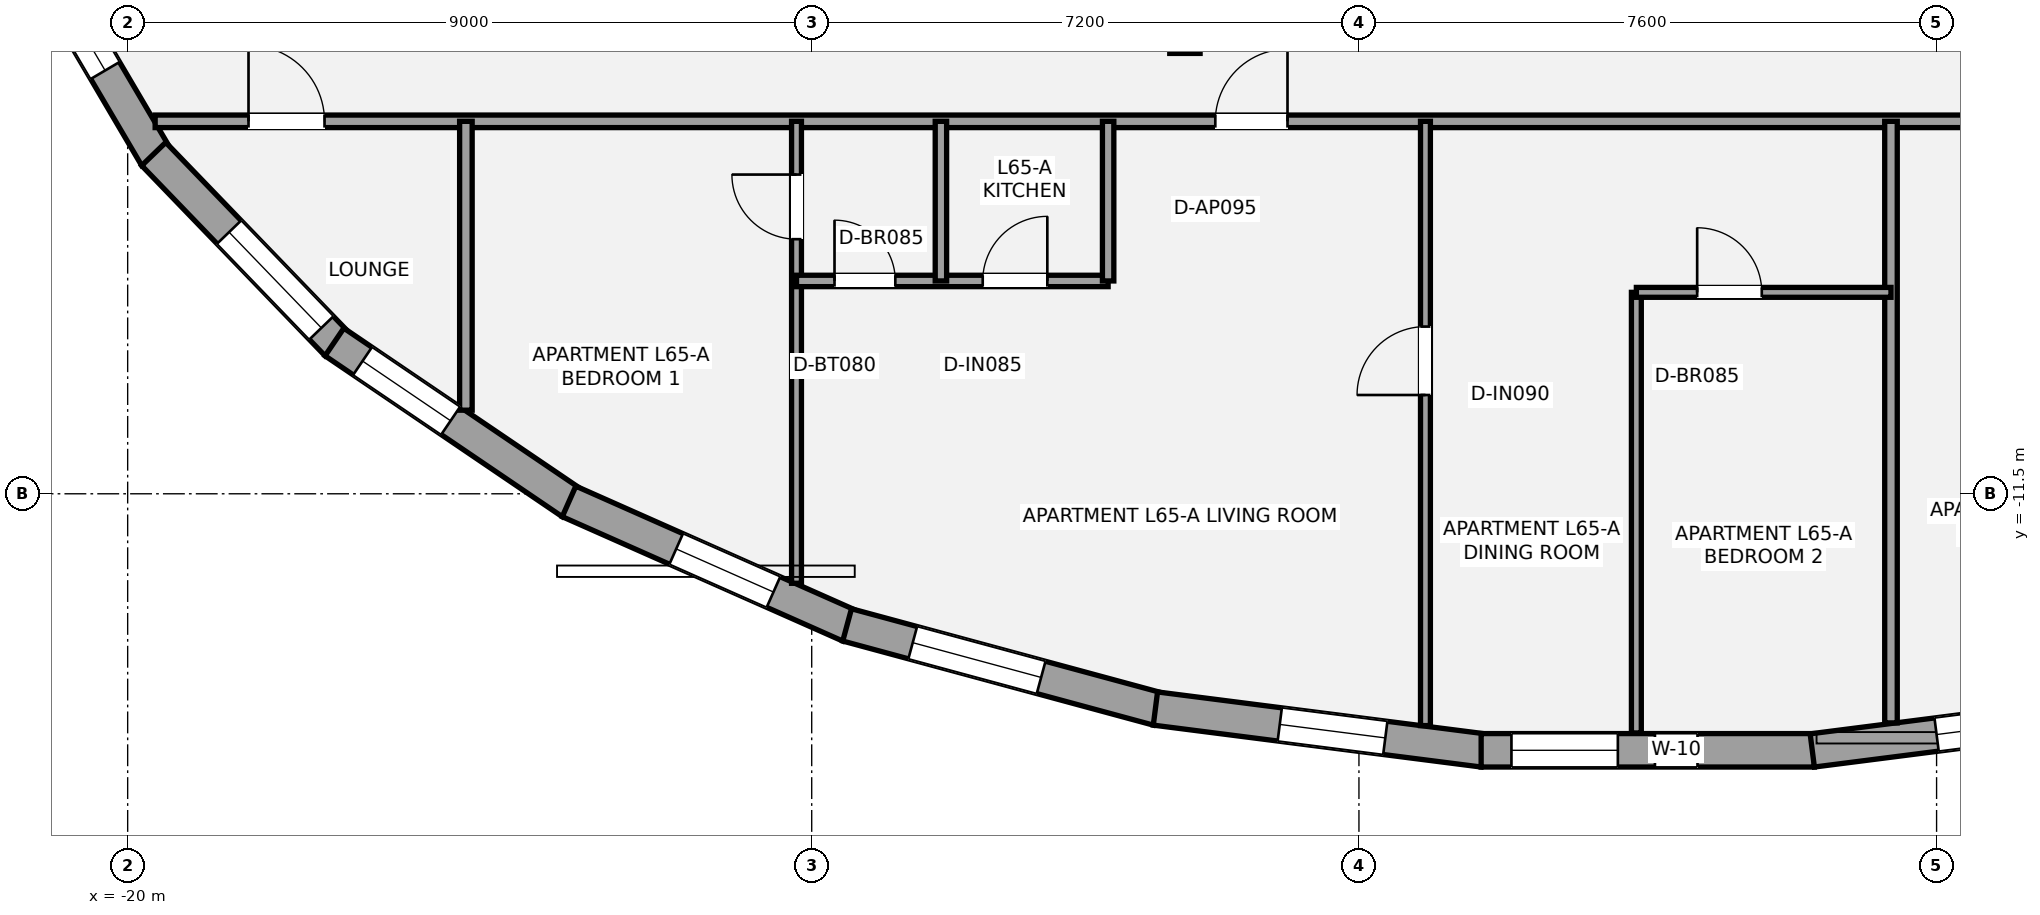
"""IFC4 building model, lengths in metres.
Left out: names, types, materials, properties, quantities, classifications, styles, units other than length and angle.
Written with IfcOpenShell. Run it as: python <this file> out.ifc"""

import sys

from ifc_helpers import new_model, si_unit, direction, frame, frame_2d, origin, origin_2d, place, context, subcontext, project, spatial, rectangle, i_section, extrude, element, fill, save


model = new_model("IFC4")
c1 = context("Model", 3, precision=1e-05, world=origin(), true_north=direction((0.0, 1.0)))
c2 = subcontext(c1, "Body", "Model", "MODEL_VIEW")
j1 = project(units=[si_unit("LENGTHUNIT", "METRE"), si_unit("PLANEANGLEUNIT", "RADIAN")], contexts=[c1])
p1 = place(None, origin())
s1 = spatial("IfcSite", under=j1, at=p1, CompositionType="ELEMENT")
p2 = place(p1, origin())
s2 = spatial("IfcBuilding", under=s1, at=p2, CompositionType="ELEMENT")
p3 = place(p2, frame((0.0, 0.0, 232.05)))
s3 = spatial("IfcBuildingStorey", under=s2, at=p3, CompositionType="ELEMENT", Elevation=232.05)
p4 = place(p3, frame((-6.09, -5.513, 0.0), z_axis=(0.0, 0.0, 1.0), x_axis=(1.0, 0.0, 0.0)))
e1 = element("IfcColumn", 1, at=p4, inside=s3, PredefinedType="COLUMN", context=c2, shape_type="SweptSolid", body=[
    extrude(i_section(OverallWidth=0.399, OverallDepth=0.387, WebThickness=0.021, FlangeThickness=0.033, at=origin_2d()), origin(), (0.0, 0.0, 1.0), 3.15),
])
p5 = place(p3, frame((-19.626, -7.071, 0.0), z_axis=(0.0, 0.0, 1.0), x_axis=(-0.507308799926, 0.861764342218, 0.0)))
e2 = element("IfcWall", 2, at=p5, inside=s3, PredefinedType="STANDARD", context=c2, shape_type="SweptSolid", body=[
    extrude(rectangle(XDim=3.215, YDim=0.44, at=frame_2d((1.607, 0.0))), origin(), (0.0, 0.0, 1.0), 2.336),
])
p6 = place(p5, frame((1.323, 0.0, 0.58)))
e3 = element("IfcOpeningElement", 3, at=p6, cuts=e2, PredefinedType="OPENING", context=c2, shape_type="SweptSolid", body=[
    extrude(rectangle(XDim=1.4, YDim=1.55, at=frame_2d((0.7, 0.775))), frame((0.0, 0.23, 0.0), z_axis=(0.0, -1.0, 0.0), x_axis=(1.0, 0.0, 0.0)), (0.0, 0.0, 1.0), 0.46),
])
p7 = place(p3, frame((-17.244, -9.532, 0.0), z_axis=(0.0, 0.0, 1.0), x_axis=(-0.694030285144, 0.71994580581, 0.0)))
e4 = element("IfcWall", 4, at=p7, inside=s3, PredefinedType="STANDARD", context=c2, shape_type="SweptSolid", body=[
    extrude(rectangle(XDim=3.476, YDim=0.44, at=frame_2d((1.738, 0.0))), origin(), (0.0, 0.0, 1.0), 2.336),
])
p8 = place(p7, frame((0.298, 0.0, 0.55)))
e5 = element("IfcOpeningElement", 5, at=p8, cuts=e4, PredefinedType="OPENING", context=c2, shape_type="SweptSolid", body=[
    extrude(rectangle(XDim=1.75, YDim=1.55, at=frame_2d((0.875, 0.775))), frame((0.0, 0.23, 0.0), z_axis=(0.0, -1.0, 0.0), x_axis=(1.0, 0.0, 0.0)), (0.0, 0.0, 1.0), 0.46),
])
p9 = place(p3, frame((-14.159, -11.619, 0.0), z_axis=(0.0, 0.0, 1.0), x_axis=(-0.827641205742, 0.56125754744, 0.0)))
e6 = element("IfcWall", 6, at=p9, inside=s3, PredefinedType="STANDARD", context=c2, shape_type="SweptSolid", body=[
    extrude(rectangle(XDim=3.771, YDim=0.44, at=frame_2d((1.885, 0.0))), origin(), (0.0, 0.0, 1.0), 2.336),
])
p10 = place(p9, frame((1.924, 0.0, 0.58)))
e7 = element("IfcOpeningElement", 7, at=p10, cuts=e6, PredefinedType="OPENING", context=c2, shape_type="SweptSolid", body=[
    extrude(rectangle(XDim=1.4, YDim=1.55, at=frame_2d((0.7, 0.775))), frame((0.0, 0.23, 0.0), z_axis=(0.0, -1.0, 0.0), x_axis=(1.0, 0.0, 0.0)), (0.0, 0.0, 1.0), 0.46),
])
p11 = place(p3, frame((-10.502, -13.236, 0.0), z_axis=(0.0, 0.0, 1.0), x_axis=(-0.914197700285, 0.405268509501, 0.0)))
e8 = element("IfcWall", 8, at=p11, inside=s3, PredefinedType="STANDARD", context=c2, shape_type="SweptSolid", body=[
    extrude(rectangle(XDim=4.037, YDim=0.44, at=frame_2d((2.019, 0.0))), origin(), (0.0, 0.0, 1.0), 2.336),
])
p12 = place(p11, frame((1.095, 0.0, 0.55)))
e9 = element("IfcOpeningElement", 9, at=p12, cuts=e8, PredefinedType="OPENING", context=c2, shape_type="SweptSolid", body=[
    extrude(rectangle(XDim=1.4, YDim=1.55, at=frame_2d((0.7, 0.775))), frame((0.0, 0.23, 0.0), z_axis=(0.0, -1.0, 0.0), x_axis=(1.0, 0.0, 0.0)), (0.0, 0.0, 1.0), 0.46),
])
p13 = place(p3, frame((-6.448, -14.331, 0.0), z_axis=(0.0, 0.0, 1.0), x_axis=(-0.965250622562, 0.261325918429, 0.0)))
e10 = element("IfcWall", 10, at=p13, inside=s3, PredefinedType="STANDARD", context=c2, shape_type="SweptSolid", body=[
    extrude(rectangle(XDim=4.233, YDim=0.44, at=frame_2d((2.117, 0.0))), origin(), (0.0, 0.0, 1.0), 2.336),
])
p14 = place(p13, frame((1.589, 0.0, 0.55)))
e11 = element("IfcOpeningElement", 11, at=p14, cuts=e10, PredefinedType="OPENING", context=c2, shape_type="SweptSolid", body=[
    extrude(rectangle(XDim=1.75, YDim=1.55, at=frame_2d((0.875, 0.775))), frame((0.0, 0.23, 0.0), z_axis=(0.0, -1.0, 0.0), x_axis=(1.0, 0.0, 0.0)), (0.0, 0.0, 1.0), 0.46),
])
p15 = place(p3, frame((-2.164, -14.877, 0.0), z_axis=(0.0, 0.0, 1.0), x_axis=(-0.991932064275, 0.126770579643, 0.0)))
e12 = element("IfcWall", 12, at=p15, inside=s3, PredefinedType="STANDARD", context=c2, shape_type="SweptSolid", body=[
    extrude(rectangle(XDim=4.349, YDim=0.44, at=frame_2d((2.174, 0.0))), origin(), (0.0, 0.0, 1.0), 2.336),
])
p16 = place(p15, frame((1.299, 0.0, 0.58)))
e13 = element("IfcOpeningElement", 13, at=p16, cuts=e12, PredefinedType="OPENING", context=c2, shape_type="SweptSolid", body=[
    extrude(rectangle(XDim=1.4, YDim=1.55, at=frame_2d((0.7, 0.775))), frame((0.0, 0.23, 0.0), z_axis=(0.0, -1.0, 0.0), x_axis=(1.0, 0.0, 0.0)), (0.0, 0.0, 1.0), 0.46),
])
p17 = place(p3, frame((2.192, -14.875, 0.0), z_axis=(0.0, 0.0, 1.0), x_axis=(-1.0, 0.0, 0.0)))
e14 = element("IfcWall", 14, at=p17, inside=s3, PredefinedType="STANDARD", context=c2, shape_type="SweptSolid", body=[
    extrude(rectangle(XDim=4.385, YDim=0.44, at=frame_2d((2.192, 0.0))), origin(), (0.0, 0.0, 1.0), 2.336),
])
p18 = place(p17, frame((2.586, 0.0, 0.58)))
e15 = element("IfcOpeningElement", 15, at=p18, cuts=e14, PredefinedType="OPENING", context=c2, shape_type="SweptSolid", body=[
    extrude(rectangle(XDim=1.4, YDim=1.55, at=frame_2d((0.7, 0.775))), frame((0.0, 0.23, 0.0), z_axis=(0.0, -1.0, 0.0), x_axis=(1.0, 0.0, 0.0)), (0.0, 0.0, 1.0), 0.46),
])
p19 = place(p17, frame((1.538, 0.0, 0.88)))
e16 = element("IfcOpeningElement", 16, at=p19, cuts=e14, PredefinedType="OPENING", context=c2, shape_type="SweptSolid", body=[
    extrude(rectangle(XDim=0.56, YDim=1.15, at=frame_2d((0.28, 0.575))), frame((0.0, 0.23, 0.0), z_axis=(0.0, -1.0, 0.0), x_axis=(1.0, 0.0, 0.0)), (0.0, 0.0, 1.0), 0.46),
])
p20 = place(p3, frame((6.478, -14.325, 0.0), z_axis=(0.0, 0.0, 1.0), x_axis=(-0.991932064275, -0.126770579643, 0.0)))
e17 = element("IfcWall", 17, at=p20, inside=s3, PredefinedType="STANDARD", context=c2, shape_type="SweptSolid", body=[
    extrude(rectangle(XDim=4.349, YDim=0.44, at=frame_2d((2.174, 0.0))), origin(), (0.0, 0.0, 1.0), 2.336),
])
p21 = place(p20, frame((0.949, 0.0, 0.55)))
e18 = element("IfcOpeningElement", 18, at=p21, cuts=e17, PredefinedType="OPENING", context=c2, shape_type="SweptSolid", body=[
    extrude(rectangle(XDim=1.75, YDim=1.55, at=frame_2d((0.875, 0.775))), frame((0.0, 0.23, 0.0), z_axis=(0.0, -1.0, 0.0), x_axis=(1.0, 0.0, 0.0)), (0.0, 0.0, 1.0), 0.46),
])
p22 = place(p3, frame((-19.638, -6.6, 0.0), z_axis=(0.0, 0.0, 1.0), x_axis=(1.0, 0.0, 0.0)))
e19 = element("IfcWall", 19, at=p22, inside=s3, PredefinedType="PARTITIONING", context=c2, shape_type="SweptSolid", body=[
    extrude(rectangle(XDim=39.277, YDim=0.165, at=frame_2d((19.638, 0.0))), origin(), (0.0, 0.0, 1.0), 2.423),
])
p23 = place(p22, frame((1.229, 0.0, 0.0)))
e20 = element("IfcOpeningElement", 20, at=p23, cuts=e19, PredefinedType="OPENING", context=c2, shape_type="SweptSolid", body=[
    extrude(rectangle(XDim=1.0, YDim=2.15, at=frame_2d((0.5, 1.075))), frame((0.0, 0.093, 0.0), z_axis=(0.0, -1.0, 0.0), x_axis=(1.0, 0.0, 0.0)), (0.0, 0.0, 1.0), 0.185),
])
p24 = place(p22, frame((37.393, 0.0, 0.0)))
e21 = element("IfcOpeningElement", 21, at=p24, cuts=e19, PredefinedType="OPENING", context=c2, shape_type="SweptSolid", body=[
    extrude(rectangle(XDim=1.0, YDim=2.15, at=frame_2d((0.5, 1.075))), frame((0.0, 0.093, 0.0), z_axis=(0.0, -1.0, 0.0), x_axis=(1.0, 0.0, 0.0)), (0.0, 0.0, 1.0), 0.185),
])
p25 = place(p22, frame((13.948, 0.0, 0.0)))
e22 = element("IfcOpeningElement", 22, at=p25, cuts=e19, PredefinedType="OPENING", context=c2, shape_type="SweptSolid", body=[
    extrude(rectangle(XDim=0.95, YDim=2.15, at=frame_2d((0.475, 1.075))), frame((0.0, 0.093, 0.0), z_axis=(0.0, -1.0, 0.0), x_axis=(1.0, 0.0, 0.0)), (0.0, 0.0, 1.0), 0.185),
])
p26 = place(p22, frame((30.738, 0.0, 0.0)))
e23 = element("IfcOpeningElement", 23, at=p26, cuts=e19, PredefinedType="OPENING", context=c2, shape_type="SweptSolid", body=[
    extrude(rectangle(XDim=0.95, YDim=2.15, at=frame_2d((0.475, 1.075))), frame((0.0, 0.093, 0.0), z_axis=(0.0, -1.0, 0.0), x_axis=(1.0, 0.0, 0.0)), (0.0, 0.0, 1.0), 0.185),
])
p27 = place(p3, frame((-15.55, -10.4, 0.0), z_axis=(0.0, 0.0, 1.0), x_axis=(0.0, 1.0, 0.0)))
e24 = element("IfcWall", 24, at=p27, inside=s3, PredefinedType="PARTITIONING", context=c2, shape_type="SweptSolid", body=[
    extrude(rectangle(XDim=3.8, YDim=0.165, at=frame_2d((1.9, 0.0))), origin(), (0.0, 0.0, 1.0), 2.423),
])
p28 = place(p3, frame((3.2, -14.514, 0.0), z_axis=(0.0, 0.0, 1.0), x_axis=(0.0, 1.0, 0.0)))
e25 = element("IfcWall", 25, at=p28, inside=s3, PredefinedType="PARTITIONING", context=c2, shape_type="SweptSolid", body=[
    extrude(rectangle(XDim=7.914, YDim=0.165, at=frame_2d((3.957, 0.0))), origin(), (0.0, 0.0, 1.0), 2.423),
])
p29 = place(p3, frame((-11.2, -12.678, 0.0), z_axis=(0.0, 0.0, 1.0), x_axis=(0.0, 1.0, 0.0)))
e26 = element("IfcWall", 26, at=p29, inside=s3, PredefinedType="PARTITIONING", context=c2, shape_type="SweptSolid", body=[
    extrude(rectangle(XDim=6.078, YDim=0.13, at=frame_2d((3.039, 0.0))), origin(), (0.0, 0.0, 1.0), 2.423),
])
p30 = place(p29, frame((4.527, 0.0, 0.0)))
e27 = element("IfcOpeningElement", 27, at=p30, cuts=e26, PredefinedType="OPENING", context=c2, shape_type="SweptSolid", body=[
    extrude(rectangle(XDim=0.85, YDim=2.1, at=frame_2d((0.425, 1.05))), frame((0.0, 0.075, 0.0), z_axis=(0.0, -1.0, 0.0), x_axis=(1.0, 0.0, 0.0)), (0.0, 0.0, 1.0), 0.15),
])
p31 = place(p3, frame((-11.2, -8.7, 0.0), z_axis=(0.0, 0.0, 1.0), x_axis=(1.0, 0.0, 0.0)))
e28 = element("IfcWall", 28, at=p31, inside=s3, PredefinedType="PLUMBINGWALL", context=c2, shape_type="SweptSolid", body=[
    extrude(rectangle(XDim=4.1, YDim=0.15, at=frame_2d((2.05, 0.0))), origin(), (0.0, 0.0, 1.0), 2.423),
])
p32 = place(p31, frame((0.5, 0.0, 0.0)))
e29 = element("IfcOpeningElement", 29, at=p32, cuts=e28, PredefinedType="OPENING", context=c2, shape_type="SweptSolid", body=[
    extrude(rectangle(XDim=0.8, YDim=2.1, at=frame_2d((0.4, 1.05))), frame((0.0, 0.085, 0.0), z_axis=(0.0, -1.0, 0.0), x_axis=(1.0, 0.0, 0.0)), (0.0, 0.0, 1.0), 0.17),
])
p33 = place(p31, frame((2.45, 0.0, 0.0)))
e30 = element("IfcOpeningElement", 30, at=p33, cuts=e28, PredefinedType="OPENING", context=c2, shape_type="SweptSolid", body=[
    extrude(rectangle(XDim=0.85, YDim=2.1, at=frame_2d((0.425, 1.05))), frame((0.0, 0.085, 0.0), z_axis=(0.0, -1.0, 0.0), x_axis=(1.0, 0.0, 0.0)), (0.0, 0.0, 1.0), 0.17),
])
p34 = place(p3, frame((-9.3, -8.7, 0.0), z_axis=(0.0, 0.0, 1.0), x_axis=(0.0, 1.0, 0.0)))
e31 = element("IfcWall", 31, at=p34, inside=s3, PredefinedType="PLUMBINGWALL", context=c2, shape_type="SweptSolid", body=[
    extrude(rectangle(XDim=2.1, YDim=0.15, at=frame_2d((1.05, 0.0))), origin(), (0.0, 0.0, 1.0), 2.97),
])
p35 = place(p3, frame((-7.1, -8.7, 0.0), z_axis=(0.0, 0.0, 1.0), x_axis=(0.0, 1.0, 0.0)))
e32 = element("IfcWall", 32, at=p35, inside=s3, PredefinedType="PLUMBINGWALL", context=c2, shape_type="SweptSolid", body=[
    extrude(rectangle(XDim=2.1, YDim=0.15, at=frame_2d((1.05, 0.0))), origin(), (0.0, 0.0, 1.0), 2.423),
])
p36 = place(p3, frame((-0.15, -14.647, 0.0), z_axis=(0.0, 0.0, 1.0), x_axis=(0.0, 1.0, 0.0)))
e33 = element("IfcWall", 33, at=p36, inside=s3, PredefinedType="PARTITIONING", context=c2, shape_type="SweptSolid", body=[
    extrude(rectangle(XDim=5.797, YDim=0.13, at=frame_2d((2.898, 0.0))), origin(), (0.0, 0.0, 1.0), 2.423),
])
p37 = place(p3, frame((-0.15, -8.85, 0.0), z_axis=(0.0, 0.0, 1.0), x_axis=(1.0, 0.0, 0.0)))
e34 = element("IfcWall", 34, at=p37, inside=s3, PredefinedType="PARTITIONING", context=c2, shape_type="SweptSolid", body=[
    extrude(rectangle(XDim=3.35, YDim=0.13, at=frame_2d((1.675, 0.0))), origin(), (0.0, 0.0, 1.0), 2.97),
])
p38 = place(p37, frame((0.8, 0.0, 0.0)))
e35 = element("IfcOpeningElement", 35, at=p38, cuts=e34, PredefinedType="OPENING", context=c2, shape_type="SweptSolid", body=[
    extrude(rectangle(XDim=0.85, YDim=2.1, at=frame_2d((0.425, 1.05))), frame((0.0, 0.075, 0.0), z_axis=(0.0, -1.0, 0.0), x_axis=(1.0, 0.0, 0.0)), (0.0, 0.0, 1.0), 0.15),
])
p39 = place(p3, frame((-2.925, -14.55, 0.0), z_axis=(0.0, 0.0, 1.0), x_axis=(0.0, 1.0, 0.0)))
e36 = element("IfcWall", 36, at=p39, inside=s3, PredefinedType="PARTITIONING", context=c2, shape_type="SweptSolid", body=[
    extrude(rectangle(XDim=7.949, YDim=0.13, at=frame_2d((3.975, 0.0))), origin(), (0.0, 0.0, 1.0), 2.423),
])
p40 = place(p39, frame((4.349, 0.0, 0.0)))
e37 = element("IfcOpeningElement", 37, at=p40, cuts=e36, PredefinedType="OPENING", context=c2, shape_type="SweptSolid", body=[
    extrude(rectangle(XDim=0.9, YDim=2.1, at=frame_2d((0.45, 1.05))), frame((0.0, 0.075, 0.0), z_axis=(0.0, -1.0, 0.0), x_axis=(1.0, 0.0, 0.0)), (0.0, 0.0, 1.0), 0.15),
])
p41 = place(p6, origin())
e38 = element("IfcWindow", 38, at=p41, inside=s3, PartitioningType="SINGLE_PANEL", PredefinedType="WINDOW", context=c2, shape_type="SweptSolid", body=[
    extrude(rectangle(XDim=1.4, YDim=1.55, at=frame_2d((0.7, 0.775))), frame((0.0, -0.01, 0.0), z_axis=(0.0, -1.0, 0.0), x_axis=(1.0, 0.0, 0.0)), (0.0, 0.0, 1.0), 0.06),
])
fill(e3, e38)
p42 = place(p8, origin())
e39 = element("IfcWindow", 39, at=p42, inside=s3, PartitioningType="SINGLE_PANEL", PredefinedType="WINDOW", context=c2, shape_type="SweptSolid", body=[
    extrude(rectangle(XDim=1.75, YDim=1.55, at=frame_2d((0.875, 0.775))), frame((0.0, -0.01, 0.0), z_axis=(0.0, -1.0, 0.0), x_axis=(1.0, 0.0, 0.0)), (0.0, 0.0, 1.0), 0.06),
])
fill(e5, e39)
p43 = place(p10, origin())
e40 = element("IfcWindow", 40, at=p43, inside=s3, PartitioningType="SINGLE_PANEL", PredefinedType="WINDOW", context=c2, shape_type="SweptSolid", body=[
    extrude(rectangle(XDim=1.4, YDim=1.55, at=frame_2d((0.7, 0.775))), frame((0.0, -0.01, 0.0), z_axis=(0.0, -1.0, 0.0), x_axis=(1.0, 0.0, 0.0)), (0.0, 0.0, 1.0), 0.06),
])
fill(e7, e40)
p44 = place(p12, origin())
e41 = element("IfcWindow", 41, at=p44, inside=s3, PartitioningType="SINGLE_PANEL", PredefinedType="WINDOW", context=c2, shape_type="SweptSolid", body=[
    extrude(rectangle(XDim=1.4, YDim=1.55, at=frame_2d((0.7, 0.775))), frame((0.0, -0.01, 0.0), z_axis=(0.0, -1.0, 0.0), x_axis=(1.0, 0.0, 0.0)), (0.0, 0.0, 1.0), 0.06),
])
fill(e9, e41)
p45 = place(p14, origin())
e42 = element("IfcWindow", 42, at=p45, inside=s3, PartitioningType="SINGLE_PANEL", PredefinedType="WINDOW", context=c2, shape_type="SweptSolid", body=[
    extrude(rectangle(XDim=1.75, YDim=1.55, at=frame_2d((0.875, 0.775))), frame((0.0, -0.01, 0.0), z_axis=(0.0, -1.0, 0.0), x_axis=(1.0, 0.0, 0.0)), (0.0, 0.0, 1.0), 0.06),
])
fill(e11, e42)
p46 = place(p16, origin())
e43 = element("IfcWindow", 43, at=p46, inside=s3, PartitioningType="SINGLE_PANEL", PredefinedType="WINDOW", context=c2, shape_type="SweptSolid", body=[
    extrude(rectangle(XDim=1.4, YDim=1.55, at=frame_2d((0.7, 0.775))), frame((0.0, -0.01, 0.0), z_axis=(0.0, -1.0, 0.0), x_axis=(1.0, 0.0, 0.0)), (0.0, 0.0, 1.0), 0.06),
])
fill(e13, e43)
p47 = place(p18, origin())
e44 = element("IfcWindow", 44, at=p47, inside=s3, PartitioningType="SINGLE_PANEL", PredefinedType="WINDOW", context=c2, shape_type="SweptSolid", body=[
    extrude(rectangle(XDim=1.4, YDim=1.55, at=frame_2d((0.7, 0.775))), frame((0.0, -0.01, 0.0), z_axis=(0.0, -1.0, 0.0), x_axis=(1.0, 0.0, 0.0)), (0.0, 0.0, 1.0), 0.06),
])
fill(e15, e44)
p48 = place(p21, origin())
e45 = element("IfcWindow", 45, at=p48, inside=s3, PartitioningType="SINGLE_PANEL", PredefinedType="WINDOW", context=c2, shape_type="SweptSolid", body=[
    extrude(rectangle(XDim=1.75, YDim=1.55, at=frame_2d((0.875, 0.775))), frame((0.0, -0.01, 0.0), z_axis=(0.0, -1.0, 0.0), x_axis=(1.0, 0.0, 0.0)), (0.0, 0.0, 1.0), 0.06),
])
fill(e18, e45)
p49 = place(p19, origin())
e46 = element("IfcWindow", 46, at=p49, inside=s3, PartitioningType="SINGLE_PANEL", PredefinedType="WINDOW", context=c2, shape_type="SweptSolid", body=[
    extrude(rectangle(XDim=0.56, YDim=1.15, at=frame_2d((0.28, 0.575))), frame((0.0, -0.01, 0.0), z_axis=(0.0, -1.0, 0.0), x_axis=(1.0, 0.0, 0.0)), (0.0, 0.0, 1.0), 0.06),
])
fill(e16, e46)
p50 = place(p23, origin())
e47 = element("IfcDoor", 47, at=p50, inside=s3, OperationType="SINGLE_SWING_LEFT", PredefinedType="DOOR", context=c2, shape_type="SweptSolid", body=[
    extrude(rectangle(XDim=1.0, YDim=2.15, at=frame_2d((0.5, 1.075))), frame((0.0, 0.025, 0.0), z_axis=(0.0, -1.0, 0.0), x_axis=(1.0, 0.0, 0.0)), (0.0, 0.0, 1.0), 0.05),
])
fill(e20, e47)
p51 = place(p30, origin())
e48 = element("IfcDoor", 48, at=p51, inside=s3, OperationType="SINGLE_SWING_RIGHT", PredefinedType="DOOR", context=c2, shape_type="SweptSolid", body=[
    extrude(rectangle(XDim=0.85, YDim=2.1, at=frame_2d((0.425, 1.05))), frame((0.0, 0.025, 0.0), z_axis=(0.0, -1.0, 0.0), x_axis=(1.0, 0.0, 0.0)), (0.0, 0.0, 1.0), 0.05),
])
fill(e27, e48)
p52 = place(p32, origin())
e49 = element("IfcDoor", 49, at=p52, inside=s3, OperationType="SINGLE_SWING_LEFT", PredefinedType="DOOR", context=c2, shape_type="SweptSolid", body=[
    extrude(rectangle(XDim=0.8, YDim=2.1, at=frame_2d((0.4, 1.05))), frame((0.0, 0.025, 0.0), z_axis=(0.0, -1.0, 0.0), x_axis=(1.0, 0.0, 0.0)), (0.0, 0.0, 1.0), 0.05),
])
fill(e29, e49)
p53 = place(p33, origin())
e50 = element("IfcDoor", 50, at=p53, inside=s3, OperationType="SINGLE_SWING_RIGHT", PredefinedType="DOOR", context=c2, shape_type="SweptSolid", body=[
    extrude(rectangle(XDim=0.85, YDim=2.1, at=frame_2d((0.425, 1.05))), frame((0.0, 0.025, 0.0), z_axis=(0.0, -1.0, 0.0), x_axis=(1.0, 0.0, 0.0)), (0.0, 0.0, 1.0), 0.05),
])
fill(e30, e50)
p54 = place(p25, origin())
e51 = element("IfcDoor", 51, at=p54, inside=s3, OperationType="SINGLE_SWING_RIGHT", PredefinedType="DOOR", context=c2, shape_type="SweptSolid", body=[
    extrude(rectangle(XDim=0.95, YDim=2.15, at=frame_2d((0.475, 1.075))), frame((0.0, 0.025, 0.0), z_axis=(0.0, -1.0, 0.0), x_axis=(1.0, 0.0, 0.0)), (0.0, 0.0, 1.0), 0.05),
])
fill(e22, e51)
p55 = place(p38, origin())
e52 = element("IfcDoor", 52, at=p55, inside=s3, OperationType="SINGLE_SWING_LEFT", PredefinedType="DOOR", context=c2, shape_type="SweptSolid", body=[
    extrude(rectangle(XDim=0.85, YDim=2.1, at=frame_2d((0.425, 1.05))), frame((0.0, 0.025, 0.0), z_axis=(0.0, -1.0, 0.0), x_axis=(1.0, 0.0, 0.0)), (0.0, 0.0, 1.0), 0.05),
])
fill(e35, e52)
p56 = place(p40, origin())
e53 = element("IfcDoor", 53, at=p56, inside=s3, OperationType="SINGLE_SWING_LEFT", PredefinedType="DOOR", context=c2, shape_type="SweptSolid", body=[
    extrude(rectangle(XDim=0.9, YDim=2.1, at=frame_2d((0.45, 1.05))), frame((0.0, 0.025, 0.0), z_axis=(0.0, -1.0, 0.0), x_axis=(1.0, 0.0, 0.0)), (0.0, 0.0, 1.0), 0.05),
])
fill(e37, e53)
save(model, sys.argv[1])
